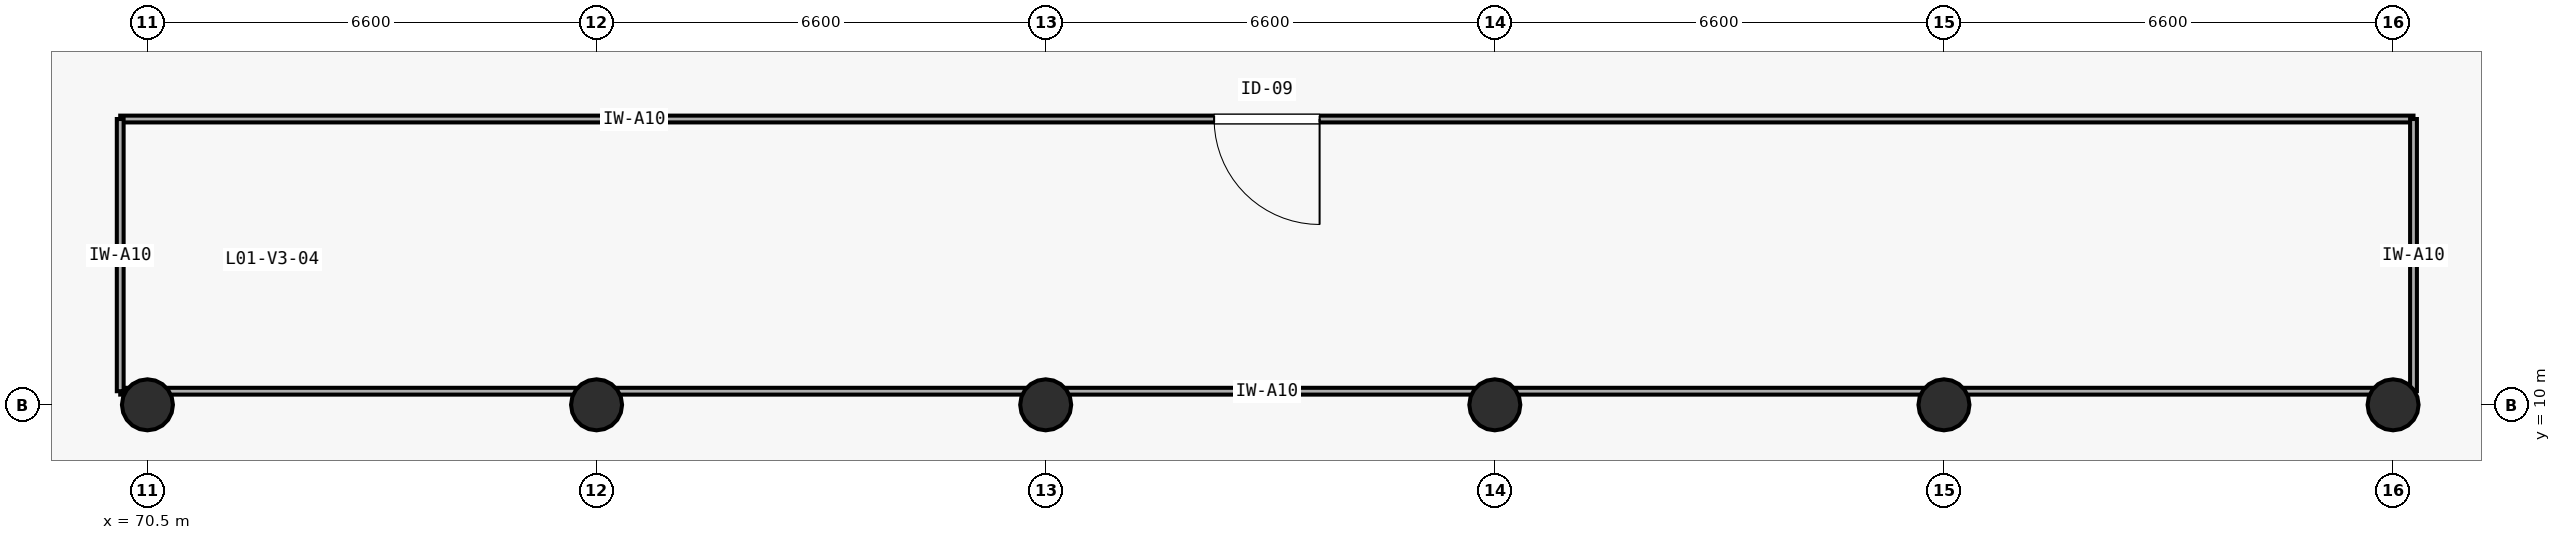
"""IFC4 building model, lengths in metres.
Left out: names, types, materials, properties, quantities, classifications, styles, units other than length and angle.
Written with IfcOpenShell. Run it as: python <this file> out.ifc"""

import sys

from ifc_helpers import new_model, si_unit, direction, frame, frame_2d, origin, origin_2d, place, context, subcontext, project, spatial, rectangle, circle, extrude, element, fill, save


model = new_model("IFC4")
c1 = context("Model", 3, precision=1e-05, world=origin(), true_north=direction((0.0, 1.0)))
c2 = subcontext(c1, "Body", "Model", "MODEL_VIEW")
j1 = project(units=[si_unit("LENGTHUNIT", "METRE"), si_unit("PLANEANGLEUNIT", "RADIAN")], contexts=[c1])
p1 = place(None, origin())
s1 = spatial("IfcSite", under=j1, at=p1, CompositionType="ELEMENT")
p2 = place(p1, origin())
s2 = spatial("IfcBuilding", under=s1, at=p2, CompositionType="ELEMENT")
p3 = place(p2, frame((0.0, 0.0, 4.2)))
s3 = spatial("IfcBuildingStorey", under=s2, at=p3, CompositionType="ELEMENT", Elevation=4.2)
for number, where, z_axis, x_axis in (
    (1, (70.5, 10.0, 0.0), (0.0, 0.0, 1.0), (1.0, 0.0, 0.0)),
    (2, (77.1, 10.0, 0.0), (0.0, 0.0, 1.0), (1.0, 0.0, 0.0)),
    (3, (83.7, 10.0, 0.0), (0.0, 0.0, 1.0), (1.0, 0.0, 0.0)),
    (4, (90.3, 10.0, 0.0), (0.0, 0.0, 1.0), (1.0, 0.0, 0.0)),
    (5, (96.9, 10.0, 0.0), (0.0, 0.0, 1.0), (1.0, 0.0, 0.0)),
    (6, (103.5, 10.0, 0.0), (0.0, 0.0, 1.0), (1.0, 0.0, 0.0)),
):
    element("IfcColumn", number, at=place(p3, frame(where, z_axis=z_axis, x_axis=x_axis)), inside=s3, PredefinedType="COLUMN", context=c2, shape_type="SweptSolid", body=[
        extrude(circle(Radius=0.375, at=origin_2d()), origin(), (0.0, 0.0, 1.0), 4.2),
    ])
p4 = place(p3, frame((70.1, 10.2, 0.0), z_axis=(0.0, 0.0, 1.0), x_axis=(1.0, 0.0, 0.0)))
e7 = element("IfcWall", 7, at=p4, inside=s3, PredefinedType="PARTITIONING", context=c2, shape_type="SweptSolid", body=[
    extrude(rectangle(XDim=33.7, YDim=0.1, at=frame_2d((16.85, 0.0))), origin(), (0.0, 0.0, 1.0), 3.135),
])
p5 = place(p3, frame((70.1, 14.2, 0.0), z_axis=(0.0, 0.0, 1.0), x_axis=(1.0, 0.0, 0.0)))
e8 = element("IfcWall", 8, at=p5, inside=s3, PredefinedType="PARTITIONING", context=c2, shape_type="SweptSolid", body=[
    extrude(rectangle(XDim=33.7, YDim=0.1, at=frame_2d((16.85, 0.0))), origin(), (0.0, 0.0, 1.0), 3.9),
])
p6 = place(p5, frame((16.075, 0.0, 0.0)))
e9 = element("IfcOpeningElement", 9, at=p6, cuts=e8, PredefinedType="OPENING", context=c2, shape_type="SweptSolid", body=[
    extrude(rectangle(XDim=1.55, YDim=2.2, at=frame_2d((0.775, 1.1))), frame((0.0, 0.06, 0.0), z_axis=(0.0, -1.0, 0.0), x_axis=(1.0, 0.0, 0.0)), (0.0, 0.0, 1.0), 0.12),
])
p7 = place(p3, frame((70.1, 10.2, 0.0), z_axis=(0.0, 0.0, 1.0), x_axis=(0.0, 1.0, 0.0)))
e10 = element("IfcWall", 10, at=p7, inside=s3, PredefinedType="PARTITIONING", context=c2, shape_type="SweptSolid", body=[
    extrude(rectangle(XDim=4.0, YDim=0.1, at=frame_2d((2.0, 0.0))), origin(), (0.0, 0.0, 1.0), 3.9),
])
p8 = place(p3, frame((103.8, 10.2, 0.0), z_axis=(0.0, 0.0, 1.0), x_axis=(0.0, 1.0, 0.0)))
e11 = element("IfcWall", 11, at=p8, inside=s3, PredefinedType="PARTITIONING", context=c2, shape_type="SweptSolid", body=[
    extrude(rectangle(XDim=4.0, YDim=0.1, at=frame_2d((2.0, 0.0))), origin(), (0.0, 0.0, 1.0), 3.505),
])
p9 = place(p6, frame((1.55, 0.0, 0.0), z_axis=(0.0, 0.0, 1.0), x_axis=(-1.0, 0.0, 0.0)))
e12 = element("IfcDoor", 12, at=p9, inside=s3, OperationType="SINGLE_SWING_LEFT", PredefinedType="DOOR", context=c2, shape_type="SweptSolid", body=[
    extrude(rectangle(XDim=1.55, YDim=2.2, at=frame_2d((0.775, 1.1))), frame((0.0, 0.025, 0.0), z_axis=(0.0, -1.0, 0.0), x_axis=(1.0, 0.0, 0.0)), (0.0, 0.0, 1.0), 0.05),
])
fill(e9, e12)
save(model, sys.argv[1])
